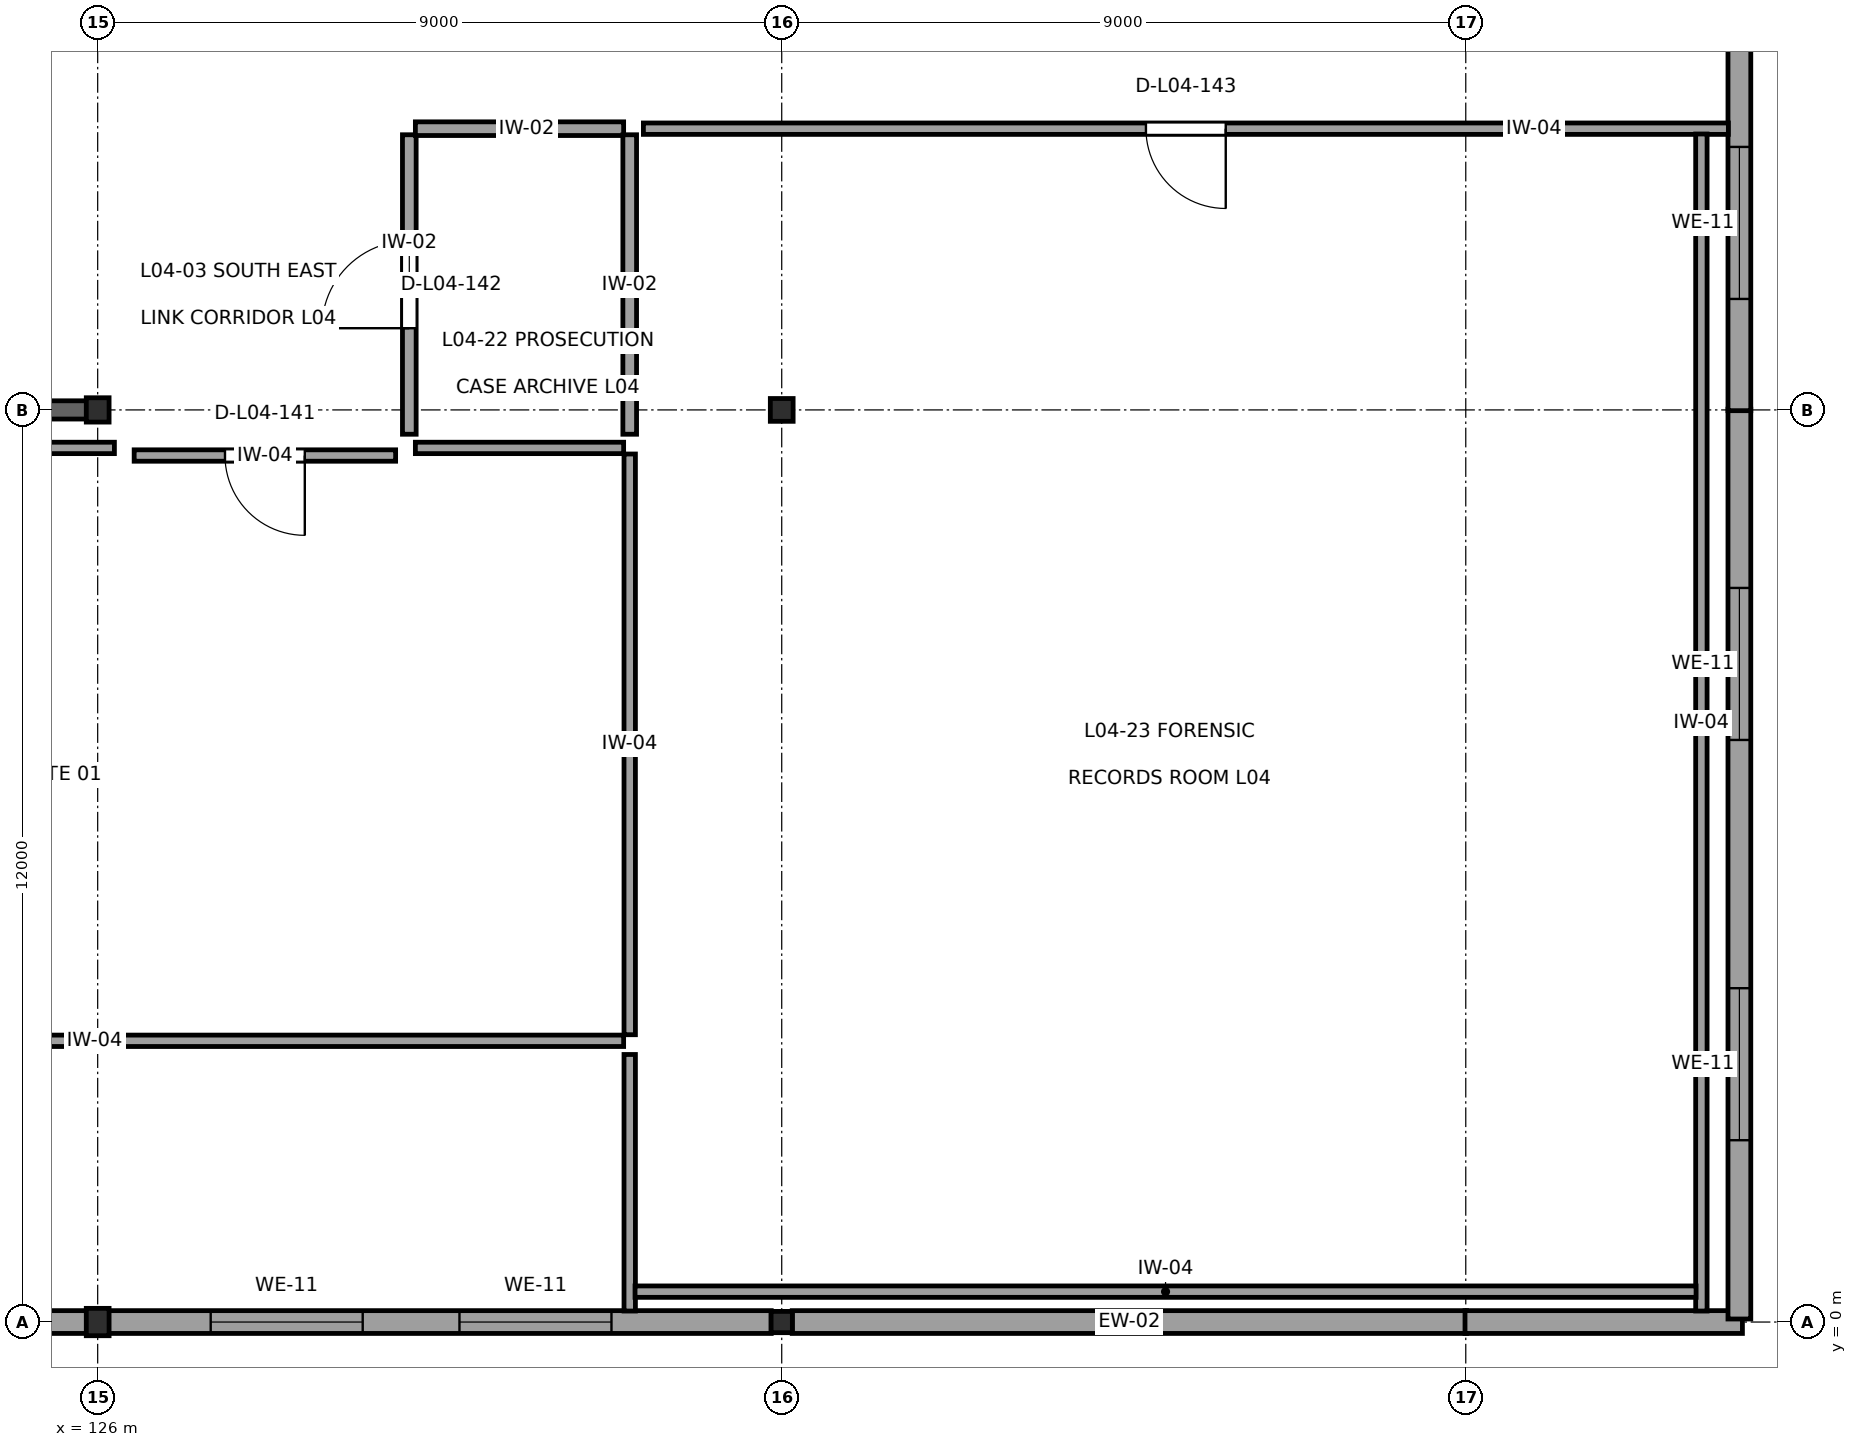
"""IFC4 building model, lengths in metres.
Left out: names, types, materials, properties, quantities, classifications, styles, units other than length and angle.
Written with IfcOpenShell. Run it as: python <this file> out.ifc"""

import sys

from ifc_helpers import new_model, si_unit, direction, frame, frame_2d, origin, origin_2d, place, context, subcontext, project, spatial, rectangle, i_section, extrude, element, fill, save


model = new_model("IFC4")
c1 = context("Model", 3, precision=1e-05, world=origin(), true_north=direction((0.0, 1.0)))
c2 = subcontext(c1, "Body", "Model", "MODEL_VIEW")
j1 = project(units=[si_unit("LENGTHUNIT", "METRE"), si_unit("PLANEANGLEUNIT", "RADIAN")], contexts=[c1])
p1 = place(None, origin())
s1 = spatial("IfcSite", under=j1, at=p1, CompositionType="ELEMENT")
p2 = place(p1, origin())
s2 = spatial("IfcBuilding", under=s1, at=p2, CompositionType="ELEMENT")
p3 = place(p2, frame((0.0, 0.0, 18.9)))
s3 = spatial("IfcBuildingStorey", under=s2, at=p3, CompositionType="ELEMENT", Elevation=18.9)
p4 = place(p3, frame((126.0, 0.0, 0.0), z_axis=(0.0, 0.0, 1.0), x_axis=(1.0, 0.0, 0.0)))
e1 = element("IfcColumn", 1, at=p4, inside=s3, PredefinedType="COLUMN", context=c2, shape_type="SweptSolid", body=[
    extrude(i_section(OverallWidth=0.3, OverallDepth=0.36, WebThickness=0.012, FlangeThickness=0.022, at=origin_2d()), origin(), (0.0, 0.0, 1.0), 4.5),
])
p5 = place(p3, frame((126.0, 12.0, 0.0), z_axis=(0.0, 0.0, 1.0), x_axis=(1.0, 0.0, 0.0)))
e2 = element("IfcColumn", 2, at=p5, inside=s3, PredefinedType="COLUMN", context=c2, shape_type="SweptSolid", body=[
    extrude(i_section(OverallWidth=0.3, OverallDepth=0.32, WebThickness=0.011, FlangeThickness=0.021, at=origin_2d()), origin(), (0.0, 0.0, 1.0), 4.5),
])
p6 = place(p3, frame((135.0, 0.0, 0.0), z_axis=(0.0, 0.0, 1.0), x_axis=(0.0, 1.0, 0.0)))
e3 = element("IfcColumn", 3, at=p6, inside=s3, PredefinedType="COLUMN", context=c2, shape_type="SweptSolid", body=[
    extrude(i_section(OverallWidth=0.28, OverallDepth=0.28, WebThickness=0.01, FlangeThickness=0.018, at=origin_2d()), origin(), (0.0, 0.0, 1.0), 4.5),
])
p7 = place(p3, frame((135.0, 12.0, 0.0), z_axis=(0.0, 0.0, 1.0), x_axis=(1.0, 0.0, 0.0)))
e4 = element("IfcColumn", 4, at=p7, inside=s3, PredefinedType="COLUMN", context=c2, shape_type="SweptSolid", body=[
    extrude(i_section(OverallWidth=0.3, OverallDepth=0.3, WebThickness=0.011, FlangeThickness=0.019, at=origin_2d()), origin(), (0.0, 0.0, 1.0), 4.5),
])
p8 = place(p3, frame((117.008, 0.0, 0.0), z_axis=(0.0, 0.0, 1.0), x_axis=(1.0, 0.0, 0.0)))
e5 = element("IfcWall", 5, at=p8, inside=s3, PredefinedType="SOLIDWALL", context=c2, shape_type="SweptSolid", body=[
    extrude(rectangle(XDim=8.984, YDim=0.3, at=frame_2d((4.492, 0.0))), origin(), (0.0, 0.0, 1.0), 3.247),
])
p9 = place(p8, frame((1.516, 0.0, 0.85)))
e6 = element("IfcOpeningElement", 6, at=p9, cuts=e5, PredefinedType="OPENING", context=c2, shape_type="SweptSolid", body=[
    extrude(rectangle(XDim=2.0, YDim=2.0, at=frame_2d((1.0, 1.0))), frame((0.0, 0.165, 0.0), z_axis=(0.0, -1.0, 0.0), x_axis=(1.0, 0.0, 0.0)), (0.0, 0.0, 1.0), 0.33),
])
p10 = place(p8, frame((5.468, 0.0, 0.85)))
e7 = element("IfcOpeningElement", 7, at=p10, cuts=e5, PredefinedType="OPENING", context=c2, shape_type="SweptSolid", body=[
    extrude(rectangle(XDim=2.0, YDim=2.0, at=frame_2d((1.0, 1.0))), frame((0.0, 0.165, 0.0), z_axis=(0.0, -1.0, 0.0), x_axis=(1.0, 0.0, 0.0)), (0.0, 0.0, 1.0), 0.33),
])
p11 = place(p3, frame((126.008, 0.0, 0.0), z_axis=(0.0, 0.0, 1.0), x_axis=(1.0, 0.0, 0.0)))
e8 = element("IfcWall", 8, at=p11, inside=s3, PredefinedType="SOLIDWALL", context=c2, shape_type="SweptSolid", body=[
    extrude(rectangle(XDim=8.854, YDim=0.3, at=frame_2d((4.427, 0.0))), origin(), (0.0, 0.0, 1.0), 3.247),
])
p12 = place(p11, frame((1.479, 0.0, 0.85)))
e9 = element("IfcOpeningElement", 9, at=p12, cuts=e8, PredefinedType="OPENING", context=c2, shape_type="SweptSolid", body=[
    extrude(rectangle(XDim=2.0, YDim=2.0, at=frame_2d((1.0, 1.0))), frame((0.0, 0.165, 0.0), z_axis=(0.0, -1.0, 0.0), x_axis=(1.0, 0.0, 0.0)), (0.0, 0.0, 1.0), 0.33),
])
p13 = place(p11, frame((4.752, 0.0, 0.85)))
e10 = element("IfcOpeningElement", 10, at=p13, cuts=e8, PredefinedType="OPENING", context=c2, shape_type="SweptSolid", body=[
    extrude(rectangle(XDim=2.0, YDim=2.0, at=frame_2d((1.0, 1.0))), frame((0.0, 0.165, 0.0), z_axis=(0.0, -1.0, 0.0), x_axis=(1.0, 0.0, 0.0)), (0.0, 0.0, 1.0), 0.33),
])
p14 = place(p3, frame((135.138, 0.0, 0.0), z_axis=(0.0, 0.0, 1.0), x_axis=(1.0, 0.0, 0.0)))
e11 = element("IfcWall", 11, at=p14, inside=s3, PredefinedType="SOLIDWALL", context=c2, shape_type="SweptSolid", body=[
    extrude(rectangle(XDim=8.872, YDim=0.3, at=frame_2d((4.436, 0.0))), origin(), (0.0, 0.0, 1.0), 3.247),
])
p15 = place(p3, frame((143.99, 0.0, 0.0), z_axis=(0.0, 0.0, 1.0), x_axis=(1.0, 0.0, 0.0)))
e12 = element("IfcWall", 12, at=p15, inside=s3, PredefinedType="SOLIDWALL", context=c2, shape_type="SweptSolid", body=[
    extrude(rectangle(XDim=3.65, YDim=0.3, at=frame_2d((1.825, 0.0))), origin(), (0.0, 0.0, 1.0), 3.247),
])
p16 = place(p3, frame((147.6, 0.04, 0.0), z_axis=(0.0, 0.0, 1.0), x_axis=(0.0, 1.0, 0.0)))
e13 = element("IfcWall", 13, at=p16, inside=s3, PredefinedType="SOLIDWALL", context=c2, shape_type="SweptSolid", body=[
    extrude(rectangle(XDim=11.97, YDim=0.3, at=frame_2d((5.985, 0.0))), origin(), (0.0, 0.0, 1.0), 3.555),
])
p17 = place(p16, frame((2.352, 0.0, 0.85)))
e14 = element("IfcOpeningElement", 14, at=p17, cuts=e13, PredefinedType="OPENING", context=c2, shape_type="SweptSolid", body=[
    extrude(rectangle(XDim=2.0, YDim=2.0, at=frame_2d((1.0, 1.0))), frame((0.0, 0.165, 0.0), z_axis=(0.0, -1.0, 0.0), x_axis=(1.0, 0.0, 0.0)), (0.0, 0.0, 1.0), 0.33),
])
p18 = place(p16, frame((7.618, 0.0, 0.85)))
e15 = element("IfcOpeningElement", 15, at=p18, cuts=e13, PredefinedType="OPENING", context=c2, shape_type="SweptSolid", body=[
    extrude(rectangle(XDim=2.0, YDim=2.0, at=frame_2d((1.0, 1.0))), frame((0.0, 0.165, 0.0), z_axis=(0.0, -1.0, 0.0), x_axis=(1.0, 0.0, 0.0)), (0.0, 0.0, 1.0), 0.33),
])
p19 = place(p3, frame((147.6, 11.99, 0.0), z_axis=(0.0, 0.0, 1.0), x_axis=(0.0, 1.0, 0.0)))
e16 = element("IfcWall", 16, at=p19, inside=s3, PredefinedType="SOLIDWALL", context=c2, shape_type="SweptSolid", body=[
    extrude(rectangle(XDim=12.05, YDim=0.3, at=frame_2d((6.025, 0.0))), origin(), (0.0, 0.0, 1.0), 3.555),
])
p20 = place(p19, frame((1.47, 0.0, 0.85)))
e17 = element("IfcOpeningElement", 17, at=p20, cuts=e16, PredefinedType="OPENING", context=c2, shape_type="SweptSolid", body=[
    extrude(rectangle(XDim=2.0, YDim=2.0, at=frame_2d((1.0, 1.0))), frame((0.0, 0.165, 0.0), z_axis=(0.0, -1.0, 0.0), x_axis=(1.0, 0.0, 0.0)), (0.0, 0.0, 1.0), 0.33),
])
p21 = place(p19, frame((7.676, 0.0, 0.85)))
e18 = element("IfcOpeningElement", 18, at=p21, cuts=e16, PredefinedType="OPENING", context=c2, shape_type="SweptSolid", body=[
    extrude(rectangle(XDim=2.0, YDim=2.0, at=frame_2d((1.0, 1.0))), frame((0.0, 0.165, 0.0), z_axis=(0.0, -1.0, 0.0), x_axis=(1.0, 0.0, 0.0)), (0.0, 0.0, 1.0), 0.33),
])
p22 = place(p3, frame((117.178, 12.0, 0.0), z_axis=(0.0, 0.0, 1.0), x_axis=(1.0, 0.0, 0.0)))
e19 = element("IfcWall", 19, at=p22, inside=s3, PredefinedType="SHEAR", context=c2, shape_type="SweptSolid", body=[
    extrude(rectangle(XDim=8.814, YDim=0.24, at=frame_2d((4.407, 0.0))), origin(), (0.0, 0.0, 1.0), 3.355),
])
p23 = place(p3, frame((126.48, 11.4, 0.0), z_axis=(0.0, 0.0, 1.0), x_axis=(1.0, 0.0, 0.0)))
e20 = element("IfcWall", 20, at=p23, inside=s3, PredefinedType="PARTITIONING", context=c2, shape_type="SweptSolid", body=[
    extrude(rectangle(XDim=3.44, YDim=0.15, at=frame_2d((1.72, 0.0))), origin(), (0.0, 0.0, 1.0), 4.14),
])
p24 = place(p23, frame((1.195, 0.0, 0.0)))
e21 = element("IfcOpeningElement", 21, at=p24, cuts=e20, PredefinedType="OPENING", context=c2, shape_type="SweptSolid", body=[
    extrude(rectangle(XDim=1.05, YDim=2.25, at=frame_2d((0.525, 1.125))), frame((0.0, 0.09, 0.0), z_axis=(0.0, -1.0, 0.0), x_axis=(1.0, 0.0, 0.0)), (0.0, 0.0, 1.0), 0.18),
])
p25 = place(p3, frame((130.18, 11.5, 0.0), z_axis=(0.0, 0.0, 1.0), x_axis=(1.0, 0.0, 0.0)))
e22 = element("IfcWall", 22, at=p25, inside=s3, PredefinedType="PARTITIONING", context=c2, shape_type="SweptSolid", body=[
    extrude(rectangle(XDim=2.74, YDim=0.15, at=frame_2d((1.37, 0.0))), origin(), (0.0, 0.0, 1.0), 4.14),
])
p26 = place(p3, frame((133.0, 11.42, 0.0), z_axis=(0.0, 0.0, 1.0), x_axis=(0.0, -1.0, 0.0)))
e23 = element("IfcWall", 23, at=p26, inside=s3, PredefinedType="PARTITIONING", context=c2, shape_type="SweptSolid", body=[
    extrude(rectangle(XDim=7.64, YDim=0.15, at=frame_2d((3.82, 0.0))), origin(), (0.0, 0.0, 1.0), 4.14),
])
p27 = place(p3, frame((132.92, 3.7, 0.0), z_axis=(0.0, 0.0, 1.0), x_axis=(-1.0, 0.0, 0.0)))
e24 = element("IfcWall", 24, at=p27, inside=s3, PredefinedType="PARTITIONING", context=c2, shape_type="SweptSolid", body=[
    extrude(rectangle(XDim=15.64, YDim=0.15, at=frame_2d((7.82, 0.0))), origin(), (0.0, 0.0, 1.0), 4.14),
])
p28 = place(p3, frame((116.795, 11.5, 0.0), z_axis=(0.0, 0.0, 1.0), x_axis=(1.0, 0.0, 0.0)))
e25 = element("IfcWall", 25, at=p28, inside=s3, PredefinedType="PARTITIONING", context=c2, shape_type="SweptSolid", body=[
    extrude(rectangle(XDim=9.425, YDim=0.15, at=frame_2d((4.712, 0.0))), origin(), (0.0, 0.0, 1.0), 4.14),
])
p29 = place(p3, frame((130.1, 11.68, 0.0), z_axis=(0.0, 0.0, 1.0), x_axis=(0.0, 1.0, 0.0)))
e26 = element("IfcWall", 26, at=p29, inside=s3, PredefinedType="PARTITIONING", context=c2, shape_type="SweptSolid", body=[
    extrude(rectangle(XDim=3.94, YDim=0.18, at=frame_2d((1.97, 0.0))), origin(), (0.0, 0.0, 1.0), 4.14),
])
p30 = place(p29, frame((1.395, 0.0, 0.0)))
e27 = element("IfcOpeningElement", 27, at=p30, cuts=e26, PredefinedType="OPENING", context=c2, shape_type="SweptSolid", body=[
    extrude(rectangle(XDim=1.15, YDim=2.15, at=frame_2d((0.575, 1.075))), frame((0.0, 0.105, 0.0), z_axis=(0.0, -1.0, 0.0), x_axis=(1.0, 0.0, 0.0)), (0.0, 0.0, 1.0), 0.21),
])
p31 = place(p3, frame((130.18, 15.7, 0.0), z_axis=(0.0, 0.0, 1.0), x_axis=(1.0, 0.0, 0.0)))
e28 = element("IfcWall", 28, at=p31, inside=s3, PredefinedType="PARTITIONING", context=c2, shape_type="SweptSolid", body=[
    extrude(rectangle(XDim=2.74, YDim=0.18, at=frame_2d((1.37, 0.0))), origin(), (0.0, 0.0, 1.0), 4.14),
])
p32 = place(p3, frame((133.0, 15.62, 0.0), z_axis=(0.0, 0.0, 1.0), x_axis=(0.0, -1.0, 0.0)))
e29 = element("IfcWall", 29, at=p32, inside=s3, PredefinedType="PARTITIONING", context=c2, shape_type="SweptSolid", body=[
    extrude(rectangle(XDim=3.94, YDim=0.18, at=frame_2d((1.97, 0.0))), origin(), (0.0, 0.0, 1.0), 4.14),
])
p33 = place(p3, frame((133.0, 0.145, 0.0), z_axis=(0.0, 0.0, 1.0), x_axis=(0.0, 1.0, 0.0)))
e30 = element("IfcWall", 30, at=p33, inside=s3, PredefinedType="PARTITIONING", context=c2, shape_type="SweptSolid", body=[
    extrude(rectangle(XDim=3.375, YDim=0.15, at=frame_2d((1.688, 0.0))), origin(), (0.0, 0.0, 1.0), 4.14),
])
p34 = place(p3, frame((133.18, 15.7, 0.0), z_axis=(0.0, 0.0, 1.0), x_axis=(1.0, 0.0, 0.0)))
e31 = element("IfcWall", 31, at=p34, inside=s3, PredefinedType="PARTITIONING", context=c2, shape_type="SweptSolid", body=[
    extrude(rectangle(XDim=14.275, YDim=0.15, at=frame_2d((7.138, 0.0))), origin(), (0.0, 0.0, 1.0), 4.14),
])
p35 = place(p34, frame((6.612, 0.0, 0.0)))
e32 = element("IfcOpeningElement", 32, at=p35, cuts=e31, PredefinedType="OPENING", context=c2, shape_type="SweptSolid", body=[
    extrude(rectangle(XDim=1.05, YDim=2.25, at=frame_2d((0.525, 1.125))), frame((0.0, 0.09, 0.0), z_axis=(0.0, -1.0, 0.0), x_axis=(1.0, 0.0, 0.0)), (0.0, 0.0, 1.0), 0.18),
])
p36 = place(p3, frame((147.1, 15.63, 0.0), z_axis=(0.0, 0.0, 1.0), x_axis=(0.0, -1.0, 0.0)))
e33 = element("IfcWall", 33, at=p36, inside=s3, PredefinedType="PARTITIONING", context=c2, shape_type="SweptSolid", body=[
    extrude(rectangle(XDim=15.485, YDim=0.15, at=frame_2d((7.742, 0.0))), origin(), (0.0, 0.0, 1.0), 4.14),
])
p37 = place(p3, frame((147.03, 0.4, 0.0), z_axis=(0.0, 0.0, 1.0), x_axis=(-1.0, 0.0, 0.0)))
e34 = element("IfcWall", 34, at=p37, inside=s3, PredefinedType="PARTITIONING", context=c2, shape_type="SweptSolid", body=[
    extrude(rectangle(XDim=13.96, YDim=0.15, at=frame_2d((6.98, 0.0))), origin(), (0.0, 0.0, 1.0), 4.14),
])
p38 = place(p12, origin())
e35 = element("IfcWindow", 35, at=p38, inside=s3, PartitioningType="SINGLE_PANEL", PredefinedType="WINDOW", context=c2, shape_type="SweptSolid", body=[
    extrude(rectangle(XDim=2.0, YDim=2.0, at=frame_2d((1.0, 1.0))), frame((0.0, 0.03, 0.0), z_axis=(0.0, -1.0, 0.0), x_axis=(1.0, 0.0, 0.0)), (0.0, 0.0, 1.0), 0.06),
])
fill(e9, e35)
p39 = place(p13, origin())
e36 = element("IfcWindow", 36, at=p39, inside=s3, PartitioningType="SINGLE_PANEL", PredefinedType="WINDOW", context=c2, shape_type="SweptSolid", body=[
    extrude(rectangle(XDim=2.0, YDim=2.0, at=frame_2d((1.0, 1.0))), frame((0.0, 0.03, 0.0), z_axis=(0.0, -1.0, 0.0), x_axis=(1.0, 0.0, 0.0)), (0.0, 0.0, 1.0), 0.06),
])
fill(e10, e36)
p40 = place(p17, origin())
e37 = element("IfcWindow", 37, at=p40, inside=s3, PartitioningType="SINGLE_PANEL", PredefinedType="WINDOW", context=c2, shape_type="SweptSolid", body=[
    extrude(rectangle(XDim=2.0, YDim=2.0, at=frame_2d((1.0, 1.0))), frame((0.0, 0.03, 0.0), z_axis=(0.0, -1.0, 0.0), x_axis=(1.0, 0.0, 0.0)), (0.0, 0.0, 1.0), 0.06),
])
fill(e14, e37)
p41 = place(p18, origin())
e38 = element("IfcWindow", 38, at=p41, inside=s3, PartitioningType="SINGLE_PANEL", PredefinedType="WINDOW", context=c2, shape_type="SweptSolid", body=[
    extrude(rectangle(XDim=2.0, YDim=2.0, at=frame_2d((1.0, 1.0))), frame((0.0, 0.03, 0.0), z_axis=(0.0, -1.0, 0.0), x_axis=(1.0, 0.0, 0.0)), (0.0, 0.0, 1.0), 0.06),
])
fill(e15, e38)
p42 = place(p20, origin())
e39 = element("IfcWindow", 39, at=p42, inside=s3, PartitioningType="SINGLE_PANEL", PredefinedType="WINDOW", context=c2, shape_type="SweptSolid", body=[
    extrude(rectangle(XDim=2.0, YDim=2.0, at=frame_2d((1.0, 1.0))), frame((0.0, 0.03, 0.0), z_axis=(0.0, -1.0, 0.0), x_axis=(1.0, 0.0, 0.0)), (0.0, 0.0, 1.0), 0.06),
])
fill(e17, e39)
p43 = place(p24, frame((1.05, 0.0, 0.0), z_axis=(0.0, 0.0, 1.0), x_axis=(-1.0, 0.0, 0.0)))
e40 = element("IfcDoor", 40, at=p43, inside=s3, OperationType="SINGLE_SWING_RIGHT", PredefinedType="DOOR", context=c2, shape_type="SweptSolid", body=[
    extrude(rectangle(XDim=1.05, YDim=2.25, at=frame_2d((0.525, 1.125))), frame((0.0, 0.025, 0.0), z_axis=(0.0, -1.0, 0.0), x_axis=(1.0, 0.0, 0.0)), (0.0, 0.0, 1.0), 0.05),
])
fill(e21, e40)
p44 = place(p30, origin())
e41 = element("IfcDoor", 41, at=p44, inside=s3, OperationType="SINGLE_SWING_LEFT", PredefinedType="DOOR", context=c2, shape_type="SweptSolid", body=[
    extrude(rectangle(XDim=1.15, YDim=2.15, at=frame_2d((0.575, 1.075))), frame((0.0, 0.025, 0.0), z_axis=(0.0, -1.0, 0.0), x_axis=(1.0, 0.0, 0.0)), (0.0, 0.0, 1.0), 0.05),
])
fill(e27, e41)
p45 = place(p35, frame((1.05, 0.0, 0.0), z_axis=(0.0, 0.0, 1.0), x_axis=(-1.0, 0.0, 0.0)))
e42 = element("IfcDoor", 42, at=p45, inside=s3, OperationType="SINGLE_SWING_RIGHT", PredefinedType="DOOR", context=c2, shape_type="SweptSolid", body=[
    extrude(rectangle(XDim=1.05, YDim=2.25, at=frame_2d((0.525, 1.125))), frame((0.0, 0.025, 0.0), z_axis=(0.0, -1.0, 0.0), x_axis=(1.0, 0.0, 0.0)), (0.0, 0.0, 1.0), 0.05),
])
fill(e32, e42)
save(model, sys.argv[1])
